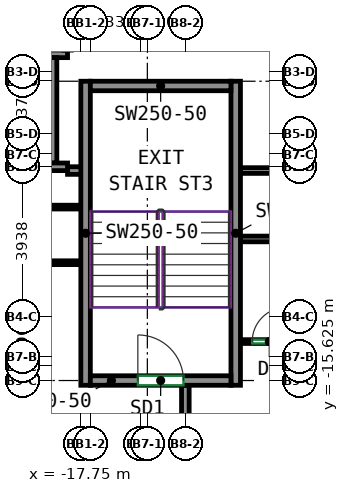
"""IFC4 building model, lengths in metres.
Left out: names, types, materials, properties, quantities, classifications, styles, units other than length and angle.
Written with IfcOpenShell. Run it as: python <this file> out.ifc"""

import sys

from ifc_helpers import new_model, si_unit, direction, frame, frame_2d, origin, place, context, subcontext, project, spatial, rectangle, extrude, source, transform, mapped, element, fill, save


model = new_model("IFC4")
c1 = context("Model", 3, precision=1e-05, world=origin(), true_north=direction((0.0, 1.0)))
c2 = subcontext(c1, "Body", "Model", "MODEL_VIEW")
j1 = project(units=[si_unit("LENGTHUNIT", "METRE"), si_unit("PLANEANGLEUNIT", "RADIAN")], contexts=[c1])
p1 = place(None, origin())
s1 = spatial("IfcSite", under=j1, at=p1, CompositionType="ELEMENT")
p2 = place(p1, origin())
s2 = spatial("IfcBuilding", under=s1, at=p2, CompositionType="ELEMENT")
p3 = place(p2, frame((0.0, 0.0, 295.0)))
s3 = spatial("IfcBuildingStorey", under=s2, at=p3, CompositionType="ELEMENT", Elevation=295.0)
m1 = source(origin(), c2, "Body", "SweptSolid", [
    extrude(rectangle(XDim=8.0, YDim=0.25, at=frame_2d((4.0, 0.0))), origin(), (0.0, 0.0, 1.0), 3.12),
])
for number, where, z_axis, x_axis in (
    (1, (-17.625, -15.75, 0.0), (0.0, 0.0, 1.0), (0.0, 1.0, 0.0)),
    (2, (-13.675, -15.75, 0.0), (0.0, 0.0, 1.0), (0.0, 1.0, 0.0)),
):
    element("IfcWall", number, at=place(p3, frame(where, z_axis=z_axis, x_axis=x_axis)), inside=s3, PredefinedType="SHEAR", context=c2, shape_type="MappedRepresentation", body=[
        mapped(m1, transform((0.0, 0.0, 0.0))),
    ])
m2 = source(origin(), c2, "Body", "SweptSolid", [
    extrude(rectangle(XDim=3.7, YDim=0.25, at=frame_2d((1.85, 0.0))), origin(), (0.0, 0.0, 1.0), 3.12),
])
p4 = place(p3, frame((-17.5, -15.625, 0.0), z_axis=(0.0, 0.0, 1.0), x_axis=(1.0, 0.0, 0.0)))
e3 = element("IfcWall", 3, at=p4, inside=s3, PredefinedType="SHEAR", context=c2, shape_type="MappedRepresentation", body=[
    mapped(m2, transform((0.0, 0.0, 0.0))),
])
p5 = place(p4, frame((1.25, 0.0, 0.0)))
e4 = element("IfcOpeningElement", 4, at=p5, cuts=e3, PredefinedType="OPENING", context=c2, shape_type="SweptSolid", body=[
    extrude(rectangle(XDim=1.2, YDim=2.1, at=frame_2d((0.6, 1.05))), frame((0.0, 0.135, 0.0), z_axis=(0.0, -1.0, 0.0), x_axis=(1.0, 0.0, 0.0)), (0.0, 0.0, 1.0), 0.27),
])
p6 = place(p3, frame((-17.5, -7.875, 0.0), z_axis=(0.0, 0.0, 1.0), x_axis=(1.0, 0.0, 0.0)))
e5 = element("IfcWall", 5, at=p6, inside=s3, PredefinedType="SHEAR", context=c2, shape_type="MappedRepresentation", body=[
    mapped(m2, transform((0.0, 0.0, 0.0))),
])
p7 = place(p3, frame((-13.55, -11.9, 0.0), z_axis=(0.0, 0.0, 1.0), x_axis=(1.0, 0.0, 0.0)))
e6 = element("IfcWall", 6, at=p7, inside=s3, PredefinedType="PARTITIONING", context=c2, shape_type="SweptSolid", body=[
    extrude(rectangle(XDim=31.3, YDim=0.15, at=frame_2d((15.65, 0.0))), origin(), (0.0, 0.0, 1.0), 3.12),
])
p8 = place(p7, frame((3.747, 0.0, 0.0)))
e7 = element("IfcOpeningElement", 7, at=p8, cuts=e6, PredefinedType="OPENING", context=c2, shape_type="SweptSolid", body=[
    extrude(rectangle(XDim=1.0, YDim=2.1, at=frame_2d((0.5, 1.05))), frame((0.0, 0.085, 0.0), z_axis=(0.0, -1.0, 0.0), x_axis=(1.0, 0.0, 0.0)), (0.0, 0.0, 1.0), 0.17),
])
p9 = place(p7, frame((22.835, 0.0, 0.0)))
e8 = element("IfcOpeningElement", 8, at=p9, cuts=e6, PredefinedType="OPENING", context=c2, shape_type="SweptSolid", body=[
    extrude(rectangle(XDim=1.0, YDim=2.1, at=frame_2d((0.5, 1.05))), frame((0.0, 0.085, 0.0), z_axis=(0.0, -1.0, 0.0), x_axis=(1.0, 0.0, 0.0)), (0.0, 0.0, 1.0), 0.17),
])
p10 = place(p3, frame((-13.55, -10.1, 0.0), z_axis=(0.0, 0.0, 1.0), x_axis=(1.0, 0.0, 0.0)))
e9 = element("IfcWall", 9, at=p10, inside=s3, PredefinedType="PARTITIONING", context=c2, shape_type="SweptSolid", body=[
    extrude(rectangle(XDim=30.65, YDim=0.15, at=frame_2d((15.325, 0.0))), origin(), (0.0, 0.0, 1.0), 3.12),
])
p11 = place(p10, frame((10.25, 0.0, 0.0)))
e10 = element("IfcOpeningElement", 10, at=p11, cuts=e9, PredefinedType="OPENING", context=c2, shape_type="SweptSolid", body=[
    extrude(rectangle(XDim=0.9, YDim=2.1, at=frame_2d((0.45, 1.05))), frame((0.0, 0.085, 0.0), z_axis=(0.0, -1.0, 0.0), x_axis=(1.0, 0.0, 0.0)), (0.0, 0.0, 1.0), 0.17),
])
p12 = place(p10, frame((22.153, 0.0, 0.0)))
e11 = element("IfcOpeningElement", 11, at=p12, cuts=e9, PredefinedType="OPENING", context=c2, shape_type="SweptSolid", body=[
    extrude(rectangle(XDim=0.9, YDim=2.1, at=frame_2d((0.45, 1.05))), frame((0.0, 0.085, 0.0), z_axis=(0.0, -1.0, 0.0), x_axis=(1.0, 0.0, 0.0)), (0.0, 0.0, 1.0), 0.17),
])
p13 = place(p3, frame((-17.75, -12.525, 0.0), z_axis=(0.0, 0.0, 1.0), x_axis=(-1.0, 0.0, 0.0)))
e12 = element("IfcWall", 12, at=p13, inside=s3, PredefinedType="PARTITIONING", context=c2, shape_type="SweptSolid", body=[
    extrude(rectangle(XDim=7.5, YDim=0.1, at=frame_2d((3.75, 0.0))), origin(), (0.0, 0.0, 1.0), 3.12),
])
p14 = place(p13, frame((5.995, 0.0, 0.0)))
e13 = element("IfcOpeningElement", 13, at=p14, cuts=e12, PredefinedType="OPENING", context=c2, shape_type="SweptSolid", body=[
    extrude(rectangle(XDim=1.0, YDim=2.1, at=frame_2d((0.5, 1.05))), frame((0.0, 0.06, 0.0), z_axis=(0.0, -1.0, 0.0), x_axis=(1.0, 0.0, 0.0)), (0.0, 0.0, 1.0), 0.12),
])
p15 = place(p3, frame((-15.0, -17.575, 0.0), z_axis=(0.0, 0.0, 1.0), x_axis=(0.0, 1.0, 0.0)))
e14 = element("IfcWall", 14, at=p15, inside=s3, PredefinedType="PARTITIONING", context=c2, shape_type="SweptSolid", body=[
    extrude(rectangle(XDim=1.825, YDim=0.2, at=frame_2d((0.913, 0.0))), origin(), (0.0, 0.0, 1.0), 3.12),
])
p16 = place(p3, frame((-17.75, -11.062, 0.0), z_axis=(0.0, 0.0, 1.0), x_axis=(-1.0, 0.0, 0.0)))
e15 = element("IfcWall", 15, at=p16, inside=s3, PredefinedType="PARTITIONING", context=c2, shape_type="SweptSolid", body=[
    extrude(rectangle(XDim=7.5, YDim=0.1, at=frame_2d((3.75, 0.0))), origin(), (0.0, 0.0, 1.0), 3.12),
])
p17 = place(p16, frame((1.115, 0.0, 0.0)))
e16 = element("IfcOpeningElement", 16, at=p17, cuts=e15, PredefinedType="OPENING", context=c2, shape_type="SweptSolid", body=[
    extrude(rectangle(XDim=0.9, YDim=2.1, at=frame_2d((0.45, 1.05))), frame((0.0, 0.06, 0.0), z_axis=(0.0, -1.0, 0.0), x_axis=(1.0, 0.0, 0.0)), (0.0, 0.0, 1.0), 0.12),
])
p18 = place(p3, frame((-17.7, -10.1, 0.0), z_axis=(0.0, 0.0, 1.0), x_axis=(-1.0, 0.0, 0.0)))
e17 = element("IfcWall", 17, at=p18, inside=s3, PredefinedType="PARTITIONING", context=c2, shape_type="SweptSolid", body=[
    extrude(rectangle(XDim=0.4, YDim=0.2, at=frame_2d((0.2, 0.0))), origin(), (0.0, 0.0, 1.0), 3.12),
])
p19 = place(p3, frame((-18.582, -7.029, 0.0), z_axis=(0.0, 0.0, 1.0), x_axis=(1.0, 0.0, 0.0)))
e18 = element("IfcWall", 18, at=p19, inside=s3, PredefinedType="PARTITIONING", context=c2, shape_type="SweptSolid", body=[
    extrude(rectangle(XDim=0.482, YDim=0.2, at=frame_2d((0.241, 0.0))), origin(), (0.0, 0.0, 1.0), 3.12),
])
p20 = place(p3, frame((-18.482, -9.902, 0.0), z_axis=(0.0, 0.0, 1.0), x_axis=(0.0, 1.0, 0.0)))
e19 = element("IfcWall", 19, at=p20, inside=s3, PredefinedType="PARTITIONING", context=c2, shape_type="SweptSolid", body=[
    extrude(rectangle(XDim=2.773, YDim=0.2, at=frame_2d((1.387, 0.0))), origin(), (0.0, 0.0, 1.0), 3.12),
])
p21 = place(p3, frame((-18.1, -10.002, 0.0), z_axis=(0.0, 0.0, 1.0), x_axis=(-1.0, 0.0, 0.0)))
e20 = element("IfcWall", 20, at=p21, inside=s3, PredefinedType="PARTITIONING", context=c2, shape_type="SweptSolid", body=[
    extrude(rectangle(XDim=0.482, YDim=0.2, at=frame_2d((0.241, 0.0))), origin(), (0.0, 0.0, 1.0), 3.12),
])
p22 = place(p3, frame((-13.55, -14.6, 0.0), z_axis=(0.0, 0.0, 1.0), x_axis=(1.0, 0.0, 0.0)))
e21 = element("IfcWall", 21, at=p22, inside=s3, PredefinedType="PARTITIONING", context=c2, shape_type="SweptSolid", body=[
    extrude(rectangle(XDim=31.3, YDim=0.1, at=frame_2d((15.65, 0.0))), origin(), (0.0, 0.0, 1.0), 3.12),
])
p23 = place(p22, frame((0.309, 0.0, 0.0)))
e22 = element("IfcOpeningElement", 22, at=p23, cuts=e21, PredefinedType="OPENING", context=c2, shape_type="SweptSolid", body=[
    extrude(rectangle(XDim=0.9, YDim=2.1, at=frame_2d((0.45, 1.05))), frame((0.0, 0.06, 0.0), z_axis=(0.0, -1.0, 0.0), x_axis=(1.0, 0.0, 0.0)), (0.0, 0.0, 1.0), 0.12),
])
p24 = place(p22, frame((4.103, 0.0, 0.0)))
e23 = element("IfcOpeningElement", 23, at=p24, cuts=e21, PredefinedType="OPENING", context=c2, shape_type="SweptSolid", body=[
    extrude(rectangle(XDim=1.0, YDim=2.1, at=frame_2d((0.5, 1.05))), frame((0.0, 0.06, 0.0), z_axis=(0.0, -1.0, 0.0), x_axis=(1.0, 0.0, 0.0)), (0.0, 0.0, 1.0), 0.12),
])
p25 = place(p22, frame((13.955, 0.0, 0.0)))
e24 = element("IfcOpeningElement", 24, at=p25, cuts=e21, PredefinedType="OPENING", context=c2, shape_type="SweptSolid", body=[
    extrude(rectangle(XDim=0.9, YDim=2.1, at=frame_2d((0.45, 1.05))), frame((0.0, 0.06, 0.0), z_axis=(0.0, -1.0, 0.0), x_axis=(1.0, 0.0, 0.0)), (0.0, 0.0, 1.0), 0.12),
])
p26 = place(p22, frame((17.453, 0.0, 0.0)))
e25 = element("IfcOpeningElement", 25, at=p26, cuts=e21, PredefinedType="OPENING", context=c2, shape_type="SweptSolid", body=[
    extrude(rectangle(XDim=1.0, YDim=2.1, at=frame_2d((0.5, 1.05))), frame((0.0, 0.06, 0.0), z_axis=(0.0, -1.0, 0.0), x_axis=(1.0, 0.0, 0.0)), (0.0, 0.0, 1.0), 0.12),
])
p27 = place(p22, frame((23.13, 0.0, 0.0)))
e26 = element("IfcOpeningElement", 26, at=p27, cuts=e21, PredefinedType="OPENING", context=c2, shape_type="SweptSolid", body=[
    extrude(rectangle(XDim=1.0, YDim=2.1, at=frame_2d((0.5, 1.05))), frame((0.0, 0.06, 0.0), z_axis=(0.0, -1.0, 0.0), x_axis=(1.0, 0.0, 0.0)), (0.0, 0.0, 1.0), 0.12),
])
p28 = place(p5, origin())
e27 = element("IfcDoor", 27, at=p28, inside=s3, OperationType="DOUBLE_DOOR_SINGLE_SWING", PredefinedType="DOOR", context=c2, shape_type="SweptSolid", body=[
    extrude(rectangle(XDim=1.2, YDim=2.1, at=frame_2d((0.6, 1.05))), frame((0.0, 0.025, 0.0), z_axis=(0.0, -1.0, 0.0), x_axis=(1.0, 0.0, 0.0)), (0.0, 0.0, 1.0), 0.05),
])
fill(e4, e27)
p29 = place(p23, origin())
e28 = element("IfcDoor", 28, at=p29, inside=s3, OperationType="SINGLE_SWING_RIGHT", PredefinedType="DOOR", context=c2, shape_type="SweptSolid", body=[
    extrude(rectangle(XDim=0.9, YDim=2.1, at=frame_2d((0.45, 1.05))), frame((0.0, 0.025, 0.0), z_axis=(0.0, -1.0, 0.0), x_axis=(1.0, 0.0, 0.0)), (0.0, 0.0, 1.0), 0.05),
])
fill(e22, e28)
save(model, sys.argv[1])
